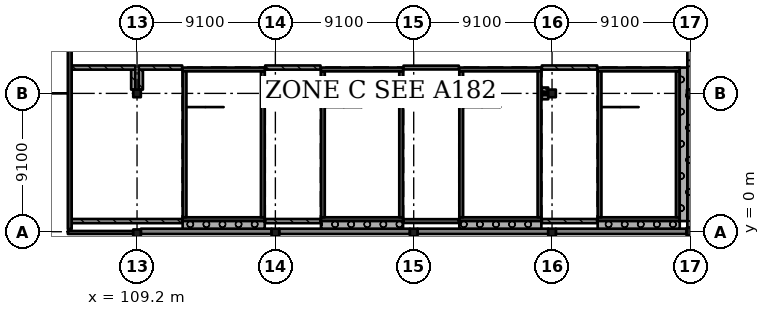
"""IFC4 building model, lengths in metres.
Left out: names, types, materials, properties, quantities, classifications, styles, units other than length and angle.
Written with IfcOpenShell. Run it as: python <this file> out.ifc"""

import sys

from ifc_helpers import new_model, si_unit, direction, frame, frame_2d, origin, origin_2d, place, context, subcontext, project, spatial, rectangle, extrude, element, fill, save


model = new_model("IFC4")
c1 = context("Model", 3, precision=1e-05, world=origin(), true_north=direction((0.0, 1.0)))
c2 = subcontext(c1, "Body", "Model", "MODEL_VIEW")
j1 = project(units=[si_unit("LENGTHUNIT", "METRE"), si_unit("PLANEANGLEUNIT", "RADIAN")], contexts=[c1])
p1 = place(None, origin())
s1 = spatial("IfcSite", under=j1, at=p1, CompositionType="ELEMENT")
p2 = place(p1, origin())
s2 = spatial("IfcBuilding", under=s1, at=p2, CompositionType="ELEMENT")
p3 = place(p2, frame((0.0, 0.0, 29.12)))
s3 = spatial("IfcBuildingStorey", under=s2, at=p3, CompositionType="ELEMENT", Elevation=29.12)
for number, where, z_axis, x_axis in (
    (1, (109.2, -0.1, 0.0), (0.0, 0.0, 1.0), (1.0, 0.0, 0.0)),
    (2, (109.2, 9.1, 0.0), (0.0, 0.0, 1.0), (1.0, 0.0, 0.0)),
    (3, (118.3, -0.05, 0.0), (0.0, 0.0, 1.0), (1.0, 0.0, 0.0)),
    (4, (118.3, 9.1, 0.0), (0.0, 0.0, 1.0), (1.0, 0.0, 0.0)),
    (5, (127.4, -0.05, 0.0), (0.0, 0.0, 1.0), (1.0, 0.0, 0.0)),
    (6, (127.4, 9.1, 0.0), (0.0, 0.0, 1.0), (1.0, 0.0, 0.0)),
    (7, (136.5, -0.05, 0.0), (0.0, 0.0, 1.0), (1.0, 0.0, 0.0)),
    (8, (136.5, 9.1, 0.0), (0.0, 0.0, 1.0), (1.0, 0.0, 0.0)),
    (9, (145.6, 0.0, 0.0), (0.0, 0.0, 1.0), (1.0, 0.0, 0.0)),
    (10, (145.625, 9.1, 0.0), (0.0, 0.0, 1.0), (1.0, 0.0, 0.0)),
):
    element("IfcColumn", number, at=place(p3, frame(where, z_axis=z_axis, x_axis=x_axis)), inside=s3, PredefinedType="COLUMN", context=c2, shape_type="SweptSolid", body=[
        extrude(rectangle(XDim=0.5, YDim=0.5, at=origin_2d()), origin(), (0.0, 0.0, 1.0), 4.55),
    ])
p4 = place(p3, frame((104.775, 40.95, 0.0), z_axis=(0.0, 0.0, 1.0), x_axis=(0.0, -1.0, 0.0)))
e11 = element("IfcWall", 11, at=p4, inside=s3, PredefinedType="SHEAR", context=c2, shape_type="SweptSolid", body=[
    extrude(rectangle(XDim=40.775, YDim=0.25, at=frame_2d((20.387, 0.0))), origin(), (0.0, 0.0, 1.0), 4.55),
])
p5 = place(p3, frame((144.9, 0.825, 0.0), z_axis=(0.0, 0.0, 1.0), x_axis=(-1.0, 0.0, 0.0)))
e12 = element("IfcWall", 12, at=p5, inside=s3, PredefinedType="SHEAR", context=c2, shape_type="SweptSolid", body=[
    extrude(rectangle(XDim=5.4, YDim=0.25, at=frame_2d((2.7, 0.0))), origin(), (0.0, 0.0, 1.0), 4.55),
])
p6 = place(p3, frame((144.9, 10.675, 0.0), z_axis=(0.0, 0.0, 1.0), x_axis=(-1.0, 0.0, 0.0)))
e13 = element("IfcWall", 13, at=p6, inside=s3, PredefinedType="SHEAR", context=c2, shape_type="SweptSolid", body=[
    extrude(rectangle(XDim=5.4, YDim=0.25, at=frame_2d((2.7, 0.0))), origin(), (0.0, 0.0, 1.0), 4.55),
])
p7 = place(p6, frame((1.5, 0.0, 0.0)))
e14 = element("IfcOpeningElement", 14, at=p7, cuts=e13, PredefinedType="OPENING", context=c2, shape_type="SweptSolid", body=[
    extrude(rectangle(XDim=2.4, YDim=2.1, at=frame_2d((1.2, 1.05))), frame((0.0, 0.135, 0.0), z_axis=(0.0, -1.0, 0.0), x_axis=(1.0, 0.0, 0.0)), (0.0, 0.0, 1.0), 0.27),
])
for number, where, z_axis, x_axis in (
    (15, (139.625, 10.55, 0.0), (0.0, 0.0, 1.0), (0.0, -1.0, 0.0)),
    (16, (144.775, 10.55, 0.0), (0.0, 0.0, 1.0), (0.0, -1.0, 0.0)),
):
    element("IfcWall", number, at=place(p3, frame(where, z_axis=z_axis, x_axis=x_axis)), inside=s3, PredefinedType="SHEAR", context=c2, shape_type="SweptSolid", body=[
        extrude(rectangle(XDim=9.6, YDim=0.25, at=frame_2d((4.8, 0.0))), origin(), (0.0, 0.0, 1.0), 4.55),
    ])
p8 = place(p3, frame((135.8, 0.825, 0.0), z_axis=(0.0, 0.0, 1.0), x_axis=(-1.0, 0.0, 0.0)))
e17 = element("IfcWall", 17, at=p8, inside=s3, PredefinedType="SHEAR", context=c2, shape_type="SweptSolid", body=[
    extrude(rectangle(XDim=5.4, YDim=0.25, at=frame_2d((2.7, 0.0))), origin(), (0.0, 0.0, 1.0), 4.55),
])
p9 = place(p3, frame((135.8, 10.675, 0.0), z_axis=(0.0, 0.0, 1.0), x_axis=(-1.0, 0.0, 0.0)))
e18 = element("IfcWall", 18, at=p9, inside=s3, PredefinedType="SHEAR", context=c2, shape_type="SweptSolid", body=[
    extrude(rectangle(XDim=5.4, YDim=0.25, at=frame_2d((2.7, 0.0))), origin(), (0.0, 0.0, 1.0), 4.55),
])
p10 = place(p9, frame((1.5, 0.0, 0.0)))
e19 = element("IfcOpeningElement", 19, at=p10, cuts=e18, PredefinedType="OPENING", context=c2, shape_type="SweptSolid", body=[
    extrude(rectangle(XDim=2.4, YDim=2.1, at=frame_2d((1.2, 1.05))), frame((0.0, 0.135, 0.0), z_axis=(0.0, -1.0, 0.0), x_axis=(1.0, 0.0, 0.0)), (0.0, 0.0, 1.0), 0.27),
])
for number, where, z_axis, x_axis in (
    (20, (130.525, 10.55, 0.0), (0.0, 0.0, 1.0), (0.0, -1.0, 0.0)),
    (21, (135.675, 10.55, 0.0), (0.0, 0.0, 1.0), (0.0, -1.0, 0.0)),
):
    element("IfcWall", number, at=place(p3, frame(where, z_axis=z_axis, x_axis=x_axis)), inside=s3, PredefinedType="SHEAR", context=c2, shape_type="SweptSolid", body=[
        extrude(rectangle(XDim=9.6, YDim=0.25, at=frame_2d((4.8, 0.0))), origin(), (0.0, 0.0, 1.0), 4.55),
    ])
p11 = place(p3, frame((126.7, 0.825, 0.0), z_axis=(0.0, 0.0, 1.0), x_axis=(-1.0, 0.0, 0.0)))
e22 = element("IfcWall", 22, at=p11, inside=s3, PredefinedType="SHEAR", context=c2, shape_type="SweptSolid", body=[
    extrude(rectangle(XDim=5.4, YDim=0.25, at=frame_2d((2.7, 0.0))), origin(), (0.0, 0.0, 1.0), 4.55),
])
p12 = place(p3, frame((126.7, 10.675, 0.0), z_axis=(0.0, 0.0, 1.0), x_axis=(-1.0, 0.0, 0.0)))
e23 = element("IfcWall", 23, at=p12, inside=s3, PredefinedType="SHEAR", context=c2, shape_type="SweptSolid", body=[
    extrude(rectangle(XDim=5.4, YDim=0.25, at=frame_2d((2.7, 0.0))), origin(), (0.0, 0.0, 1.0), 4.55),
])
p13 = place(p12, frame((1.5, 0.0, 0.0)))
e24 = element("IfcOpeningElement", 24, at=p13, cuts=e23, PredefinedType="OPENING", context=c2, shape_type="SweptSolid", body=[
    extrude(rectangle(XDim=2.4, YDim=2.1, at=frame_2d((1.2, 1.05))), frame((0.0, 0.135, 0.0), z_axis=(0.0, -1.0, 0.0), x_axis=(1.0, 0.0, 0.0)), (0.0, 0.0, 1.0), 0.27),
])
for number, where, z_axis, x_axis in (
    (25, (121.425, 10.55, 0.0), (0.0, 0.0, 1.0), (0.0, -1.0, 0.0)),
    (26, (126.575, 10.55, 0.0), (0.0, 0.0, 1.0), (0.0, -1.0, 0.0)),
):
    element("IfcWall", number, at=place(p3, frame(where, z_axis=z_axis, x_axis=x_axis)), inside=s3, PredefinedType="SHEAR", context=c2, shape_type="SweptSolid", body=[
        extrude(rectangle(XDim=9.6, YDim=0.25, at=frame_2d((4.8, 0.0))), origin(), (0.0, 0.0, 1.0), 4.55),
    ])
p14 = place(p3, frame((117.6, 0.825, 0.0), z_axis=(0.0, 0.0, 1.0), x_axis=(-1.0, 0.0, 0.0)))
e27 = element("IfcWall", 27, at=p14, inside=s3, PredefinedType="SHEAR", context=c2, shape_type="SweptSolid", body=[
    extrude(rectangle(XDim=5.4, YDim=0.25, at=frame_2d((2.7, 0.0))), origin(), (0.0, 0.0, 1.0), 4.55),
])
p15 = place(p3, frame((117.6, 10.675, 0.0), z_axis=(0.0, 0.0, 1.0), x_axis=(-1.0, 0.0, 0.0)))
e28 = element("IfcWall", 28, at=p15, inside=s3, PredefinedType="SHEAR", context=c2, shape_type="SweptSolid", body=[
    extrude(rectangle(XDim=5.4, YDim=0.25, at=frame_2d((2.7, 0.0))), origin(), (0.0, 0.0, 1.0), 4.55),
])
p16 = place(p15, frame((1.5, 0.0, 0.0)))
e29 = element("IfcOpeningElement", 29, at=p16, cuts=e28, PredefinedType="OPENING", context=c2, shape_type="SweptSolid", body=[
    extrude(rectangle(XDim=2.4, YDim=2.1, at=frame_2d((1.2, 1.05))), frame((0.0, 0.135, 0.0), z_axis=(0.0, -1.0, 0.0), x_axis=(1.0, 0.0, 0.0)), (0.0, 0.0, 1.0), 0.27),
])
for number, where, z_axis, x_axis in (
    (30, (112.325, 10.55, 0.0), (0.0, 0.0, 1.0), (0.0, -1.0, 0.0)),
    (31, (117.475, 10.55, 0.0), (0.0, 0.0, 1.0), (0.0, -1.0, 0.0)),
):
    element("IfcWall", number, at=place(p3, frame(where, z_axis=z_axis, x_axis=x_axis)), inside=s3, PredefinedType="SHEAR", context=c2, shape_type="SweptSolid", body=[
        extrude(rectangle(XDim=9.6, YDim=0.25, at=frame_2d((4.8, 0.0))), origin(), (0.0, 0.0, 1.0), 4.55),
    ])
p17 = place(p3, frame((104.65, -0.05, 0.0), z_axis=(0.0, 0.0, 1.0), x_axis=(1.0, 0.0, 0.0)))
e32 = element("IfcWall", 32, at=p17, inside=s3, PredefinedType="SOLIDWALL", context=c2, shape_type="SweptSolid", body=[
    extrude(rectangle(XDim=4.3, YDim=0.2, at=frame_2d((2.15, 0.0))), origin(), (0.0, 0.0, 1.0), 4.5),
])
p18 = place(p17, frame((0.65, 0.0, 0.6)))
e33 = element("IfcOpeningElement", 33, at=p18, cuts=e32, PredefinedType="OPENING", context=c2, shape_type="SweptSolid", body=[
    extrude(rectangle(XDim=3.0, YDim=3.0, at=frame_2d((1.5, 1.5))), frame((0.0, 0.11, 0.0), z_axis=(0.0, -1.0, 0.0), x_axis=(1.0, 0.0, 0.0)), (0.0, 0.0, 1.0), 0.22),
])
p19 = place(p3, frame((109.45, 0.025, 0.0), z_axis=(0.0, 0.0, 1.0), x_axis=(1.0, 0.0, 0.0)))
e34 = element("IfcWall", 34, at=p19, inside=s3, PredefinedType="SOLIDWALL", context=c2, shape_type="SweptSolid", body=[
    extrude(rectangle(XDim=8.6, YDim=0.35, at=frame_2d((4.3, 0.0))), origin(), (0.0, 0.0, 1.0), 4.5),
])
p20 = place(p3, frame((118.55, 0.025, 0.0), z_axis=(0.0, 0.0, 1.0), x_axis=(1.0, 0.0, 0.0)))
e35 = element("IfcWall", 35, at=p20, inside=s3, PredefinedType="SOLIDWALL", context=c2, shape_type="SweptSolid", body=[
    extrude(rectangle(XDim=8.6, YDim=0.35, at=frame_2d((4.3, 0.0))), origin(), (0.0, 0.0, 1.0), 4.5),
])
for number, where, z_axis, x_axis in (
    (36, (127.65, 0.025, 0.0), (0.0, 0.0, 1.0), (1.0, 0.0, 0.0)),
    (37, (136.75, 0.025, 0.0), (0.0, 0.0, 1.0), (1.0, 0.0, 0.0)),
    (38, (145.575, 0.25, 0.0), (0.0, 0.0, 1.0), (0.0, 1.0, 0.0)),
):
    element("IfcWall", number, at=place(p3, frame(where, z_axis=z_axis, x_axis=x_axis)), inside=s3, PredefinedType="SOLIDWALL", context=c2, shape_type="SweptSolid", body=[
        extrude(rectangle(XDim=8.6, YDim=0.35, at=frame_2d((4.3, 0.0))), origin(), (0.0, 0.0, 1.0), 4.5),
    ])
p21 = place(p3, frame((145.575, 9.35, 0.0), z_axis=(0.0, 0.0, 1.0), x_axis=(0.0, 1.0, 0.0)))
e39 = element("IfcWall", 39, at=p21, inside=s3, PredefinedType="SOLIDWALL", context=c2, shape_type="SweptSolid", body=[
    extrude(rectangle(XDim=8.6, YDim=0.35, at=frame_2d((4.3, 0.0))), origin(), (0.0, 0.0, 1.0), 4.5),
])
p22 = place(p3, frame((139.5, 0.45, 0.0), z_axis=(0.0, 0.0, 1.0), x_axis=(1.0, 0.0, 0.0)))
e40 = element("IfcWall", 40, at=p22, inside=s3, PredefinedType="SOLIDWALL", context=c2, shape_type="SweptSolid", body=[
    extrude(rectangle(XDim=5.4, YDim=0.5, at=frame_2d((2.7, 0.0))), origin(), (0.0, 0.0, 1.0), 3.88),
])
p23 = place(p3, frame((145.15, 0.7, 0.0), z_axis=(0.0, 0.0, 1.0), x_axis=(0.0, 1.0, 0.0)))
e41 = element("IfcWall", 41, at=p23, inside=s3, PredefinedType="SOLIDWALL", context=c2, shape_type="SweptSolid", body=[
    extrude(rectangle(XDim=10.1, YDim=0.5, at=frame_2d((5.05, 0.0))), origin(), (0.0, 0.0, 1.0), 4.55),
])
p24 = place(p3, frame((130.4, 0.45, 0.0), z_axis=(0.0, 0.0, 1.0), x_axis=(1.0, 0.0, 0.0)))
e42 = element("IfcWall", 42, at=p24, inside=s3, PredefinedType="SOLIDWALL", context=c2, shape_type="SweptSolid", body=[
    extrude(rectangle(XDim=5.4, YDim=0.5, at=frame_2d((2.7, 0.0))), origin(), (0.0, 0.0, 1.0), 3.88),
])
p25 = place(p3, frame((121.3, 0.45, 0.0), z_axis=(0.0, 0.0, 1.0), x_axis=(1.0, 0.0, 0.0)))
e43 = element("IfcWall", 43, at=p25, inside=s3, PredefinedType="SOLIDWALL", context=c2, shape_type="SweptSolid", body=[
    extrude(rectangle(XDim=5.4, YDim=0.5, at=frame_2d((2.7, 0.0))), origin(), (0.0, 0.0, 1.0), 3.88),
])
p26 = place(p3, frame((112.2, 0.45, 0.0), z_axis=(0.0, 0.0, 1.0), x_axis=(1.0, 0.0, 0.0)))
e44 = element("IfcWall", 44, at=p26, inside=s3, PredefinedType="SOLIDWALL", context=c2, shape_type="SweptSolid", body=[
    extrude(rectangle(XDim=5.4, YDim=0.5, at=frame_2d((2.7, 0.0))), origin(), (0.0, 0.0, 1.0), 3.88),
])
p27 = place(p3, frame((108.95, 9.35, 0.0), z_axis=(0.0, 0.0, 1.0), x_axis=(0.0, 1.0, 0.0)))
e45 = element("IfcWall", 45, at=p27, inside=s3, PredefinedType="SOLIDWALL", context=c2, shape_type="SweptSolid", body=[
    extrude(rectangle(XDim=1.312, YDim=0.275, at=frame_2d((0.656, 0.0))), origin(), (0.0, 0.0, 1.0), 3.88),
])
p28 = place(p3, frame((109.087, 10.8, 0.0), z_axis=(0.0, 0.0, 1.0), x_axis=(-1.0, 0.0, 0.0)))
e46 = element("IfcWall", 46, at=p28, inside=s3, PredefinedType="SOLIDWALL", context=c2, shape_type="SweptSolid", body=[
    extrude(rectangle(XDim=4.188, YDim=0.275, at=frame_2d((2.094, 0.0))), origin(), (0.0, 0.0, 1.0), 3.88),
])
p29 = place(p28, frame((1.45, 0.0, 0.0)))
e47 = element("IfcOpeningElement", 47, at=p29, cuts=e46, PredefinedType="OPENING", context=c2, shape_type="SweptSolid", body=[
    extrude(rectangle(XDim=1.2, YDim=2.4, at=frame_2d((0.6, 1.2))), frame((0.0, 0.147, 0.0), z_axis=(0.0, -1.0, 0.0), x_axis=(1.0, 0.0, 0.0)), (0.0, 0.0, 1.0), 0.295),
])
p30 = place(p3, frame((109.45, 10.663, 0.0), z_axis=(0.0, 0.0, 1.0), x_axis=(0.0, -1.0, 0.0)))
e48 = element("IfcWall", 48, at=p30, inside=s3, PredefinedType="SOLIDWALL", context=c2, shape_type="SweptSolid", body=[
    extrude(rectangle(XDim=1.312, YDim=0.275, at=frame_2d((0.656, 0.0))), origin(), (0.0, 0.0, 1.0), 3.88),
])
p31 = place(p3, frame((112.17, 0.7, 0.0), z_axis=(0.0, 0.0, 1.0), x_axis=(-1.0, 0.0, 0.0)))
e49 = element("IfcWall", 49, at=p31, inside=s3, PredefinedType="SOLIDWALL", context=c2, shape_type="SweptSolid", body=[
    extrude(rectangle(XDim=7.27, YDim=0.275, at=frame_2d((3.635, 0.0))), origin(), (0.0, 0.0, 1.0), 3.88),
])
p32 = place(p3, frame((112.17, 10.8, 0.0), z_axis=(0.0, 0.0, 1.0), x_axis=(-1.0, 0.0, 0.0)))
e50 = element("IfcWall", 50, at=p32, inside=s3, PredefinedType="SOLIDWALL", context=c2, shape_type="SweptSolid", body=[
    extrude(rectangle(XDim=2.857, YDim=0.275, at=frame_2d((1.429, 0.0))), origin(), (0.0, 0.0, 1.0), 3.88),
])
for number, where, z_axis, x_axis in (
    (51, (117.63, 8.85, 0.0), (0.0, 0.0, 1.0), (1.0, 0.0, 0.0)),
    (52, (118.05, 9.35, 0.0), (0.0, 0.0, 1.0), (-1.0, 0.0, 0.0)),
):
    element("IfcWall", number, at=place(p3, frame(where, z_axis=z_axis, x_axis=x_axis)), inside=s3, PredefinedType="SOLIDWALL", context=c2, shape_type="SweptSolid", body=[
        extrude(rectangle(XDim=0.42, YDim=0.275, at=frame_2d((0.21, 0.0))), origin(), (0.0, 0.0, 1.0), 3.88),
    ])
p33 = place(p3, frame((121.27, 0.7, 0.0), z_axis=(0.0, 0.0, 1.0), x_axis=(-1.0, 0.0, 0.0)))
e53 = element("IfcWall", 53, at=p33, inside=s3, PredefinedType="SOLIDWALL", context=c2, shape_type="SweptSolid", body=[
    extrude(rectangle(XDim=3.64, YDim=0.275, at=frame_2d((1.82, 0.0))), origin(), (0.0, 0.0, 1.0), 3.88),
])
p34 = place(p3, frame((121.27, 10.8, 0.0), z_axis=(0.0, 0.0, 1.0), x_axis=(-1.0, 0.0, 0.0)))
e54 = element("IfcWall", 54, at=p34, inside=s3, PredefinedType="SOLIDWALL", context=c2, shape_type="SweptSolid", body=[
    extrude(rectangle(XDim=3.64, YDim=0.275, at=frame_2d((1.82, 0.0))), origin(), (0.0, 0.0, 1.0), 3.88),
])
p35 = place(p34, frame((1.25, 0.0, 0.0)))
e55 = element("IfcOpeningElement", 55, at=p35, cuts=e54, PredefinedType="OPENING", context=c2, shape_type="SweptSolid", body=[
    extrude(rectangle(XDim=1.2, YDim=2.4, at=frame_2d((0.6, 1.2))), frame((0.0, 0.147, 0.0), z_axis=(0.0, -1.0, 0.0), x_axis=(1.0, 0.0, 0.0)), (0.0, 0.0, 1.0), 0.295),
])
for number, where, z_axis, x_axis in (
    (56, (126.73, 8.85, 0.0), (0.0, 0.0, 1.0), (1.0, 0.0, 0.0)),
    (57, (127.15, 9.35, 0.0), (0.0, 0.0, 1.0), (-1.0, 0.0, 0.0)),
):
    element("IfcWall", number, at=place(p3, frame(where, z_axis=z_axis, x_axis=x_axis)), inside=s3, PredefinedType="SOLIDWALL", context=c2, shape_type="SweptSolid", body=[
        extrude(rectangle(XDim=0.42, YDim=0.25, at=frame_2d((0.21, 0.0))), origin(), (0.0, 0.0, 1.0), 3.88),
    ])
p36 = place(p3, frame((130.37, 0.7, 0.0), z_axis=(0.0, 0.0, 1.0), x_axis=(-1.0, 0.0, 0.0)))
e58 = element("IfcWall", 58, at=p36, inside=s3, PredefinedType="SOLIDWALL", context=c2, shape_type="SweptSolid", body=[
    extrude(rectangle(XDim=3.64, YDim=0.25, at=frame_2d((1.82, 0.0))), origin(), (0.0, 0.0, 1.0), 3.88),
])
p37 = place(p3, frame((130.37, 10.8, 0.0), z_axis=(0.0, 0.0, 1.0), x_axis=(-1.0, 0.0, 0.0)))
e59 = element("IfcWall", 59, at=p37, inside=s3, PredefinedType="SOLIDWALL", context=c2, shape_type="SweptSolid", body=[
    extrude(rectangle(XDim=3.64, YDim=0.25, at=frame_2d((1.82, 0.0))), origin(), (0.0, 0.0, 1.0), 3.88),
])
p38 = place(p37, frame((1.35, 0.0, 0.0)))
e60 = element("IfcOpeningElement", 60, at=p38, cuts=e59, PredefinedType="OPENING", context=c2, shape_type="SweptSolid", body=[
    extrude(rectangle(XDim=1.0, YDim=2.1, at=frame_2d((0.5, 1.05))), frame((0.0, 0.135, 0.0), z_axis=(0.0, -1.0, 0.0), x_axis=(1.0, 0.0, 0.0)), (0.0, 0.0, 1.0), 0.27),
])
for number, where, z_axis, x_axis in (
    (61, (135.83, 8.85, 0.0), (0.0, 0.0, 1.0), (1.0, 0.0, 0.0)),
    (62, (136.25, 9.35, 0.0), (0.0, 0.0, 1.0), (-1.0, 0.0, 0.0)),
):
    element("IfcWall", number, at=place(p3, frame(where, z_axis=z_axis, x_axis=x_axis)), inside=s3, PredefinedType="SOLIDWALL", context=c2, shape_type="SweptSolid", body=[
        extrude(rectangle(XDim=0.42, YDim=0.275, at=frame_2d((0.21, 0.0))), origin(), (0.0, 0.0, 1.0), 3.88),
    ])
p39 = place(p3, frame((139.47, 0.7, 0.0), z_axis=(0.0, 0.0, 1.0), x_axis=(-1.0, 0.0, 0.0)))
e63 = element("IfcWall", 63, at=p39, inside=s3, PredefinedType="SOLIDWALL", context=c2, shape_type="SweptSolid", body=[
    extrude(rectangle(XDim=3.64, YDim=0.275, at=frame_2d((1.82, 0.0))), origin(), (0.0, 0.0, 1.0), 3.88),
])
p40 = place(p3, frame((139.47, 10.8, 0.0), z_axis=(0.0, 0.0, 1.0), x_axis=(-1.0, 0.0, 0.0)))
e64 = element("IfcWall", 64, at=p40, inside=s3, PredefinedType="SOLIDWALL", context=c2, shape_type="SweptSolid", body=[
    extrude(rectangle(XDim=3.64, YDim=0.275, at=frame_2d((1.82, 0.0))), origin(), (0.0, 0.0, 1.0), 3.88),
])
p41 = place(p40, frame((1.25, 0.0, 0.0)))
e65 = element("IfcOpeningElement", 65, at=p41, cuts=e64, PredefinedType="OPENING", context=c2, shape_type="SweptSolid", body=[
    extrude(rectangle(XDim=1.2, YDim=2.4, at=frame_2d((0.6, 1.2))), frame((0.0, 0.147, 0.0), z_axis=(0.0, -1.0, 0.0), x_axis=(1.0, 0.0, 0.0)), (0.0, 0.0, 1.0), 0.295),
])
p42 = place(p18, origin())
e66 = element("IfcWindow", 66, at=p42, inside=s3, PartitioningType="SINGLE_PANEL", PredefinedType="WINDOW", context=c2, shape_type="SweptSolid", body=[
    extrude(rectangle(XDim=3.0, YDim=3.0, at=frame_2d((1.5, 1.5))), frame((0.0, 0.03, 0.0), z_axis=(0.0, -1.0, 0.0), x_axis=(1.0, 0.0, 0.0)), (0.0, 0.0, 1.0), 0.06),
])
fill(e33, e66)
p43 = place(p41, origin())
e67 = element("IfcDoor", 67, at=p43, inside=s3, OperationType="SINGLE_SWING_LEFT", PredefinedType="DOOR", context=c2, shape_type="SweptSolid", body=[
    extrude(rectangle(XDim=1.2, YDim=2.4, at=frame_2d((0.6, 1.2))), frame((0.0, 0.025, 0.0), z_axis=(0.0, -1.0, 0.0), x_axis=(1.0, 0.0, 0.0)), (0.0, 0.0, 1.0), 0.05),
])
fill(e65, e67)
p44 = place(p38, origin())
e68 = element("IfcDoor", 68, at=p44, inside=s3, OperationType="SINGLE_SWING_LEFT", PredefinedType="DOOR", context=c2, shape_type="SweptSolid", body=[
    extrude(rectangle(XDim=1.0, YDim=2.1, at=frame_2d((0.5, 1.05))), frame((0.0, 0.025, 0.0), z_axis=(0.0, -1.0, 0.0), x_axis=(1.0, 0.0, 0.0)), (0.0, 0.0, 1.0), 0.05),
])
fill(e60, e68)
p45 = place(p35, origin())
e69 = element("IfcDoor", 69, at=p45, inside=s3, OperationType="SINGLE_SWING_LEFT", PredefinedType="DOOR", context=c2, shape_type="SweptSolid", body=[
    extrude(rectangle(XDim=1.2, YDim=2.4, at=frame_2d((0.6, 1.2))), frame((0.0, 0.025, 0.0), z_axis=(0.0, -1.0, 0.0), x_axis=(1.0, 0.0, 0.0)), (0.0, 0.0, 1.0), 0.05),
])
fill(e55, e69)
p46 = place(p29, origin())
e70 = element("IfcDoor", 70, at=p46, inside=s3, OperationType="SINGLE_SWING_RIGHT", PredefinedType="DOOR", context=c2, shape_type="SweptSolid", body=[
    extrude(rectangle(XDim=1.2, YDim=2.4, at=frame_2d((0.6, 1.2))), frame((0.0, 0.025, 0.0), z_axis=(0.0, -1.0, 0.0), x_axis=(1.0, 0.0, 0.0)), (0.0, 0.0, 1.0), 0.05),
])
fill(e47, e70)
p47 = place(p7, origin())
e71 = element("IfcDoor", 71, at=p47, inside=s3, OperationType="DOUBLE_DOOR_SINGLE_SWING", PredefinedType="DOOR", context=c2, shape_type="SweptSolid", body=[
    extrude(rectangle(XDim=2.4, YDim=2.1, at=frame_2d((1.2, 1.05))), frame((0.0, 0.025, 0.0), z_axis=(0.0, -1.0, 0.0), x_axis=(1.0, 0.0, 0.0)), (0.0, 0.0, 1.0), 0.05),
])
fill(e14, e71)
p48 = place(p10, origin())
e72 = element("IfcDoor", 72, at=p48, inside=s3, OperationType="DOUBLE_DOOR_SINGLE_SWING", PredefinedType="DOOR", context=c2, shape_type="SweptSolid", body=[
    extrude(rectangle(XDim=2.4, YDim=2.1, at=frame_2d((1.2, 1.05))), frame((0.0, 0.025, 0.0), z_axis=(0.0, -1.0, 0.0), x_axis=(1.0, 0.0, 0.0)), (0.0, 0.0, 1.0), 0.05),
])
fill(e19, e72)
p49 = place(p13, origin())
e73 = element("IfcDoor", 73, at=p49, inside=s3, OperationType="DOUBLE_DOOR_SINGLE_SWING", PredefinedType="DOOR", context=c2, shape_type="SweptSolid", body=[
    extrude(rectangle(XDim=2.4, YDim=2.1, at=frame_2d((1.2, 1.05))), frame((0.0, 0.025, 0.0), z_axis=(0.0, -1.0, 0.0), x_axis=(1.0, 0.0, 0.0)), (0.0, 0.0, 1.0), 0.05),
])
fill(e24, e73)
p50 = place(p16, origin())
e74 = element("IfcDoor", 74, at=p50, inside=s3, OperationType="DOUBLE_DOOR_SINGLE_SWING", PredefinedType="DOOR", context=c2, shape_type="SweptSolid", body=[
    extrude(rectangle(XDim=2.4, YDim=2.1, at=frame_2d((1.2, 1.05))), frame((0.0, 0.025, 0.0), z_axis=(0.0, -1.0, 0.0), x_axis=(1.0, 0.0, 0.0)), (0.0, 0.0, 1.0), 0.05),
])
fill(e29, e74)
save(model, sys.argv[1])
